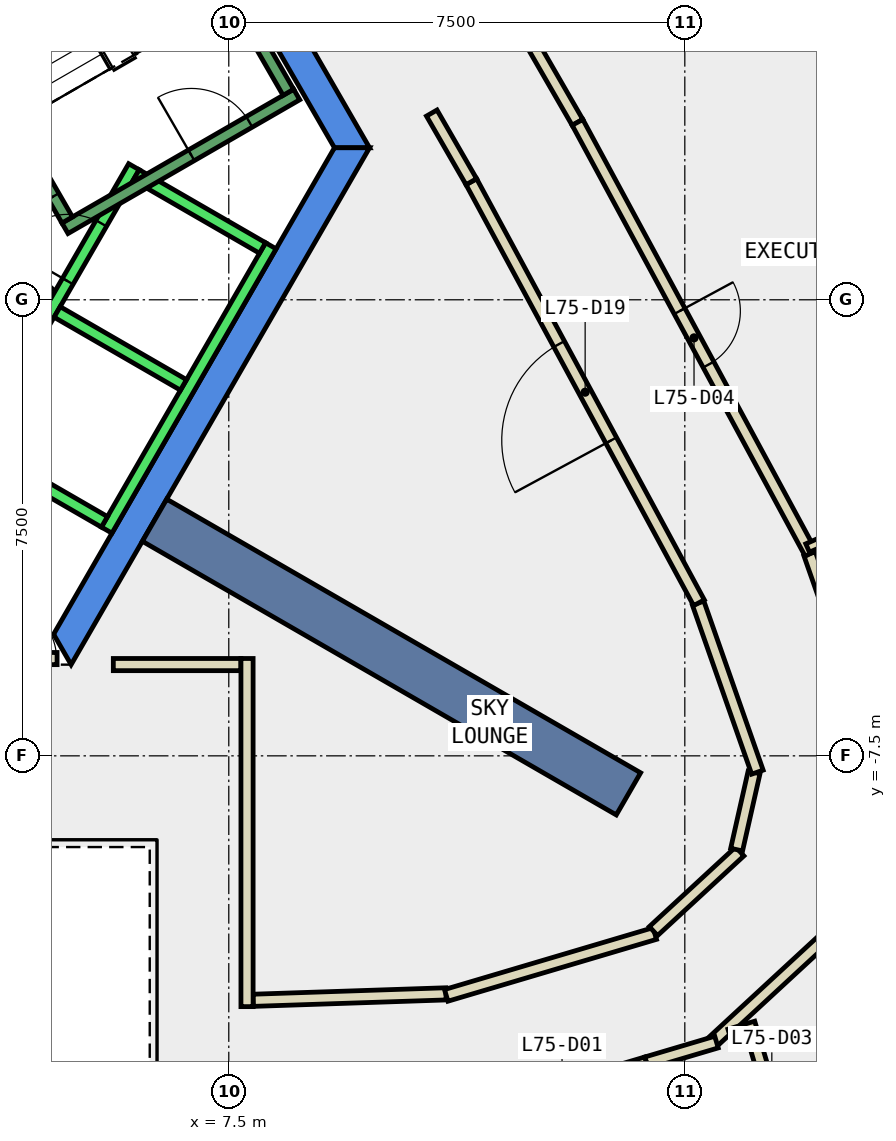
"""IFC4 building model, lengths in metres.
Left out: names, types, materials, properties, quantities, classifications, styles, units other than length and angle.
Written with IfcOpenShell. Run it as: python <this file> out.ifc"""

import sys

from ifc_helpers import new_model, si_unit, direction, frame, frame_2d, origin, place, context, subcontext, project, spatial, polyline, rectangle, outline, extrude, element, fill, save


model = new_model("IFC4")
c1 = context("Model", 3, precision=1e-05, world=origin(), true_north=direction((0.0, 1.0)))
c2 = subcontext(c1, "Body", "Model", "MODEL_VIEW")
j1 = project(units=[si_unit("LENGTHUNIT", "METRE"), si_unit("PLANEANGLEUNIT", "RADIAN")], contexts=[c1])
p1 = place(None, origin())
s1 = spatial("IfcSite", under=j1, at=p1, CompositionType="ELEMENT")
p2 = place(p1, origin())
s2 = spatial("IfcBuilding", under=s1, at=p2, CompositionType="ELEMENT")
p3 = place(p2, frame((0.0, 0.0, 318.8)))
s3 = spatial("IfcBuildingStorey", under=s2, at=p3, CompositionType="ELEMENT", Elevation=318.8)
p4 = place(p3, frame((0.0, 0.0, -0.34)))
e1 = element("IfcWall", 1, at=p4, inside=s3, PredefinedType="SHEAR", context=c2, shape_type="SweptSolid", body=[
    extrude(outline(polyline([(5.486, 9.998), (5.053, 9.748), (9.238, 2.5), (9.815, 2.5), (5.486, 9.998)])), origin(), (0.0, 0.0, 1.0), 3.6),
])
p5 = place(p3, frame((0.0, 0.0, -0.34)))
e2 = element("IfcWall", 2, at=p5, inside=s3, PredefinedType="SHEAR", context=c2, shape_type="SweptSolid", body=[
    extrude(outline(polyline([(4.907, -6.0), (9.815, 2.5), (9.238, 2.5), (4.619, -5.5), (4.907, -6.0)])), origin(), (0.0, 0.0, 1.0), 3.6),
])
p6 = place(p3, frame((6.279, -3.625, -0.34), z_axis=(0.0, 0.0, 1.0), x_axis=(0.866017533419, -0.500013631625, 0.0)))
e3 = element("IfcWall", 3, at=p6, inside=s3, PredefinedType="SHEAR", context=c2, shape_type="SweptSolid", body=[
    extrude(rectangle(XDim=9.0, YDim=0.8, at=frame_2d((4.5, 0.0))), origin(), (0.0, 0.0, 1.0), 3.6),
])
p7 = place(p3, frame((7.9, -11.52, 0.0), z_axis=(0.0, 0.0, 1.0), x_axis=(0.999442599499, 0.033383982774, 0.0)))
e4 = element("IfcWall", 4, at=p7, inside=s3, PredefinedType="PARTITIONING", context=c2, shape_type="SweptSolid", body=[
    extrude(rectangle(XDim=3.174, YDim=0.2, at=frame_2d((1.587, 0.0))), origin(), (0.0, 0.0, 1.0), 3.26),
])
p8 = place(p3, frame((11.076, -11.439, 0.0), z_axis=(0.0, 0.0, 1.0), x_axis=(0.958760241353, 0.284216114252, 0.0)))
e5 = element("IfcWall", 5, at=p8, inside=s3, PredefinedType="PARTITIONING", context=c2, shape_type="SweptSolid", body=[
    extrude(rectangle(XDim=3.578, YDim=0.2, at=frame_2d((1.789, 0.0))), origin(), (0.0, 0.0, 1.0), 3.26),
])
p9 = place(p3, frame((14.484, -10.382, 0.0), z_axis=(0.0, 0.0, 1.0), x_axis=(0.735026247728, 0.678038653139, 0.0)))
e6 = element("IfcWall", 6, at=p9, inside=s3, PredefinedType="PARTITIONING", context=c2, shape_type="SweptSolid", body=[
    extrude(rectangle(XDim=1.932, YDim=0.2, at=frame_2d((0.966, 0.0))), origin(), (0.0, 0.0, 1.0), 3.26),
])
p10 = place(p3, frame((15.852, -9.042, 0.0), z_axis=(0.0, 0.0, 1.0), x_axis=(0.220324178782, 0.975426704701, 0.0)))
e7 = element("IfcWall", 7, at=p10, inside=s3, PredefinedType="PARTITIONING", context=c2, shape_type="SweptSolid", body=[
    extrude(rectangle(XDim=1.302, YDim=0.2, at=frame_2d((0.651, 0.0))), origin(), (0.0, 0.0, 1.0), 3.26),
])
p11 = place(p3, frame((16.194, -7.768, 0.0), z_axis=(0.0, 0.0, 1.0), x_axis=(-0.330981563235, 0.943637220969, 0.0)))
e8 = element("IfcWall", 8, at=p11, inside=s3, PredefinedType="PARTITIONING", context=c2, shape_type="SweptSolid", body=[
    extrude(rectangle(XDim=2.946, YDim=0.2, at=frame_2d((1.473, 0.0))), origin(), (0.0, 0.0, 1.0), 3.26),
])
p12 = place(p3, frame((15.233, -4.982, 0.0), z_axis=(0.0, 0.0, 1.0), x_axis=(-0.475643534049, 0.879638123615, 0.0)))
e9 = element("IfcWall", 9, at=p12, inside=s3, PredefinedType="PARTITIONING", context=c2, shape_type="SweptSolid", body=[
    extrude(rectangle(XDim=7.871, YDim=0.2, at=frame_2d((3.936, 0.0))), origin(), (0.0, 0.0, 1.0), 3.26),
])
p13 = place(p12, frame((3.036, 0.0, 0.0)))
e10 = element("IfcOpeningElement", 10, at=p13, cuts=e9, PredefinedType="OPENING", context=c2, shape_type="SweptSolid", body=[
    extrude(rectangle(XDim=1.8, YDim=2.1, at=frame_2d((0.9, 1.05))), frame((0.0, 0.11, 0.0), z_axis=(0.0, -1.0, 0.0), x_axis=(1.0, 0.0, 0.0)), (0.0, 0.0, 1.0), 0.22),
])
p14 = place(p3, frame((11.489, 1.942, 0.0), z_axis=(0.0, 0.0, 1.0), x_axis=(-0.499544076393, 0.866288471435, 0.0)))
e11 = element("IfcWall", 11, at=p14, inside=s3, PredefinedType="PARTITIONING", context=c2, shape_type="SweptSolid", body=[
    extrude(rectangle(XDim=1.303, YDim=0.2, at=frame_2d((0.652, 0.0))), origin(), (0.0, 0.0, 1.0), 3.26),
])
p15 = place(p3, frame((14.371, -12.548, 0.0), z_axis=(0.0, 0.0, 1.0), x_axis=(-0.958773475867, -0.284171465799, 0.0)))
e12 = element("IfcWall", 12, at=p15, inside=s3, PredefinedType="PARTITIONING", context=c2, shape_type="SweptSolid", body=[
    extrude(rectangle(XDim=2.9, YDim=0.2, at=frame_2d((1.45, 0.0))), origin(), (0.0, 0.0, 1.0), 3.26),
])
p16 = place(p15, frame((0.95, 0.0, 0.0)))
e13 = element("IfcOpeningElement", 13, at=p16, cuts=e12, PredefinedType="OPENING", context=c2, shape_type="SweptSolid", body=[
    extrude(rectangle(XDim=1.0, YDim=2.1, at=frame_2d((0.5, 1.05))), frame((0.0, 0.11, 0.0), z_axis=(0.0, -1.0, 0.0), x_axis=(1.0, 0.0, 0.0)), (0.0, 0.0, 1.0), 0.22),
])
p17 = place(p3, frame((17.053, -4.177, 0.0), z_axis=(0.0, 0.0, 1.0), x_axis=(0.33112192567, -0.943587977001, 0.0)))
e14 = element("IfcWall", 14, at=p17, inside=s3, PredefinedType="PARTITIONING", context=c2, shape_type="SweptSolid", body=[
    extrude(rectangle(XDim=3.678, YDim=0.2, at=frame_2d((1.839, 0.0))), origin(), (0.0, 0.0, 1.0), 3.26),
])
p18 = place(p3, frame((17.718, -10.119, 0.0), z_axis=(0.0, 0.0, 1.0), x_axis=(-0.734673909713, -0.678420405344, 0.0)))
e15 = element("IfcWall", 15, at=p18, inside=s3, PredefinedType="PARTITIONING", context=c2, shape_type="SweptSolid", body=[
    extrude(rectangle(XDim=3.107, YDim=0.2, at=frame_2d((1.554, 0.0))), origin(), (0.0, 0.0, 1.0), 3.26),
])
p19 = place(p3, frame((15.521, -12.207, 0.0), z_axis=(0.0, 0.0, 1.0), x_axis=(-0.958717989575, -0.2843586054, 0.0)))
e16 = element("IfcWall", 16, at=p19, inside=s3, PredefinedType="PARTITIONING", context=c2, shape_type="SweptSolid", body=[
    extrude(rectangle(XDim=1.199, YDim=0.2, at=frame_2d((0.6, 0.0))), origin(), (0.0, 0.0, 1.0), 3.26),
])
p20 = place(p3, frame((11.344, 6.193, 0.0), z_axis=(0.0, 0.0, 1.0), x_axis=(0.50004096614, -0.86600175068, 0.0)))
e17 = element("IfcWall", 17, at=p20, inside=s3, PredefinedType="PARTITIONING", context=c2, shape_type="SweptSolid", body=[
    extrude(rectangle(XDim=3.782, YDim=0.2, at=frame_2d((1.891, 0.0))), origin(), (0.0, 0.0, 1.0), 3.26),
])
p21 = place(p3, frame((13.235, 2.918, 0.0), z_axis=(0.0, 0.0, 1.0), x_axis=(0.475681790703, -0.879617436158, 0.0)))
e18 = element("IfcWall", 18, at=p21, inside=s3, PredefinedType="PARTITIONING", context=c2, shape_type="SweptSolid", body=[
    extrude(rectangle(XDim=8.058, YDim=0.2, at=frame_2d((4.029, 0.0))), origin(), (0.0, 0.0, 1.0), 3.26),
])
p22 = place(p21, frame((3.529, 0.0, 0.0)))
e19 = element("IfcOpeningElement", 19, at=p22, cuts=e18, PredefinedType="OPENING", context=c2, shape_type="SweptSolid", body=[
    extrude(rectangle(XDim=1.0, YDim=2.1, at=frame_2d((0.5, 1.05))), frame((0.0, 0.11, 0.0), z_axis=(0.0, -1.0, 0.0), x_axis=(1.0, 0.0, 0.0)), (0.0, 0.0, 1.0), 0.22),
])
p23 = place(p3, frame((5.601, -5.999, 0.0), z_axis=(0.0, 0.0, 1.0), x_axis=(1.0, 0.0, 0.0)))
e20 = element("IfcWall", 20, at=p23, inside=s3, PredefinedType="PARTITIONING", context=c2, shape_type="SweptSolid", body=[
    extrude(rectangle(XDim=2.099, YDim=0.2, at=frame_2d((1.049, 0.0))), origin(), (0.0, 0.0, 1.0), 3.26),
])
p24 = place(p3, frame((7.8, -5.899, 0.0), z_axis=(0.0, 0.0, 1.0), x_axis=(0.0, -1.0, 0.0)))
e21 = element("IfcWall", 21, at=p24, inside=s3, PredefinedType="PARTITIONING", context=c2, shape_type="SweptSolid", body=[
    extrude(rectangle(XDim=5.725, YDim=0.2, at=frame_2d((2.863, 0.0))), origin(), (0.0, 0.0, 1.0), 3.26),
])
p25 = place(p3, frame((16.808, -14.433, 0.0), z_axis=(0.0, 0.0, 1.0), x_axis=(-0.284524220245, 0.958668852156, 0.0)))
e22 = element("IfcWall", 22, at=p25, inside=s3, PredefinedType="PARTITIONING", context=c2, shape_type="SweptSolid", body=[
    extrude(rectangle(XDim=2.651, YDim=0.2, at=frame_2d((1.325, 0.0))), origin(), (0.0, 0.0, 1.0), 3.26),
])
p26 = place(p25, frame((0.875, 0.0, 0.0)))
e23 = element("IfcOpeningElement", 23, at=p26, cuts=e22, PredefinedType="OPENING", context=c2, shape_type="SweptSolid", body=[
    extrude(rectangle(XDim=0.9, YDim=2.1, at=frame_2d((0.45, 1.05))), frame((0.0, 0.11, 0.0), z_axis=(0.0, -1.0, 0.0), x_axis=(1.0, 0.0, 0.0)), (0.0, 0.0, 1.0), 0.22),
])
p27 = place(p3, frame((15.987, -12.017, 0.0), z_axis=(0.0, 0.0, 1.0), x_axis=(-0.958598776535, -0.284760224794, 0.0)))
e24 = element("IfcWall", 24, at=p27, inside=s3, PredefinedType="PARTITIONING", context=c2, shape_type="SweptSolid", body=[
    extrude(rectangle(XDim=0.26, YDim=0.2, at=frame_2d((0.13, 0.0))), origin(), (0.0, 0.0, 1.0), 3.26),
])
p28 = place(p3, frame((17.02, -4.082, 0.0), z_axis=(0.0, 0.0, 1.0), x_axis=(0.914599611743, 0.404360668462, 0.0)))
e25 = element("IfcWall", 25, at=p28, inside=s3, PredefinedType="PARTITIONING", context=c2, shape_type="SweptSolid", body=[
    extrude(rectangle(XDim=4.296, YDim=0.15, at=frame_2d((2.148, 0.0))), origin(), (0.0, 0.0, 1.0), 3.26),
])
p29 = place(p3, frame((3.75, -5.9, 0.0), z_axis=(0.0, 0.0, 1.0), x_axis=(1.0, 0.0, 0.0)))
e26 = element("IfcWall", 26, at=p29, inside=s3, PredefinedType="PARTITIONING", context=c2, shape_type="SweptSolid", body=[
    extrude(rectangle(XDim=0.926, YDim=0.2, at=frame_2d((0.463, 0.0))), origin(), (0.0, 0.0, 1.0), 2.4),
])
p30 = place(p29, frame((0.017, 0.0, 0.0)))
e27 = element("IfcOpeningElement", 27, at=p30, cuts=e26, PredefinedType="OPENING", context=c2, shape_type="SweptSolid", body=[
    extrude(rectangle(XDim=0.9, YDim=2.1, at=frame_2d((0.45, 1.05))), frame((0.0, 0.11, 0.0), z_axis=(0.0, -1.0, 0.0), x_axis=(1.0, 0.0, 0.0)), (0.0, 0.0, 1.0), 0.22),
])
p31 = place(p3, frame((3.24, -2.488, 0.0), z_axis=(0.0, 0.0, 1.0), x_axis=(0.500034260056, 0.866005622828, 0.0)))
e28 = element("IfcWall", 28, at=p31, inside=s3, PredefinedType="STANDARD", context=c2, shape_type="SweptSolid", body=[
    extrude(rectangle(XDim=5.399, YDim=0.2, at=frame_2d((2.7, 0.0))), origin(), (0.0, 0.0, 1.0), 3.26),
])
p32 = place(p31, frame((3.225, 0.0, 0.0)))
e29 = element("IfcOpeningElement", 29, at=p32, cuts=e28, PredefinedType="OPENING", context=c2, shape_type="SweptSolid", body=[
    extrude(rectangle(XDim=1.1, YDim=2.1, at=frame_2d((0.55, 1.05))), frame((0.0, 0.11, 0.0), z_axis=(0.0, -1.0, 0.0), x_axis=(1.0, 0.0, 0.0)), (0.0, 0.0, 1.0), 0.22),
])
p33 = place(p31, frame((1.225, 0.0, 0.0)))
e30 = element("IfcOpeningElement", 30, at=p33, cuts=e28, PredefinedType="OPENING", context=c2, shape_type="SweptSolid", body=[
    extrude(rectangle(XDim=1.1, YDim=2.1, at=frame_2d((0.55, 1.05))), frame((0.0, 0.11, 0.0), z_axis=(0.0, -1.0, 0.0), x_axis=(1.0, 0.0, 0.0)), (0.0, 0.0, 1.0), 0.22),
])
p34 = place(p3, frame((5.492, -3.788, 0.0), z_axis=(0.0, 0.0, 1.0), x_axis=(0.500034260056, 0.866005622828, 0.0)))
e31 = element("IfcWall", 31, at=p34, inside=s3, PredefinedType="STANDARD", context=c2, shape_type="SweptSolid", body=[
    extrude(rectangle(XDim=5.399, YDim=0.2, at=frame_2d((2.7, 0.0))), origin(), (0.0, 0.0, 1.0), 3.26),
])
p35 = place(p3, frame((3.377, -2.452, 0.0), z_axis=(0.0, 0.0, 1.0), x_axis=(0.865955154139, -0.50012165622, 0.0)))
e32 = element("IfcWall", 32, at=p35, inside=s3, PredefinedType="STANDARD", context=c2, shape_type="SweptSolid", body=[
    extrude(rectangle(XDim=2.4, YDim=0.2, at=frame_2d((1.2, 0.0))), origin(), (0.0, 0.0, 1.0), 3.26),
])
for number, where, z_axis, x_axis in (
    (33, (4.677, -0.2, 0.0), (0.0, 0.0, 1.0), (0.866, -0.5, 0.0)),
    (34, (5.977, 2.052, 0.0), (0.0, 0.0, 1.0), (0.866, -0.5, 0.0)),
):
    element("IfcWall", number, at=place(p3, frame(where, z_axis=z_axis, x_axis=x_axis)), inside=s3, PredefinedType="STANDARD", context=c2, shape_type="SweptSolid", body=[
        extrude(rectangle(XDim=2.399, YDim=0.2, at=frame_2d((1.2, 0.0))), origin(), (0.0, 0.0, 1.0), 3.26),
    ])
p36 = place(p3, frame((4.806, 1.176, 0.0), z_axis=(0.0, 0.0, 1.0), x_axis=(0.866059941101, 0.499940174841, 0.0)))
e35 = element("IfcWall", 35, at=p36, inside=s3, PredefinedType="STANDARD", context=c2, shape_type="SweptSolid", body=[
    extrude(rectangle(XDim=4.4, YDim=0.2, at=frame_2d((2.2, 0.0))), origin(), (0.0, 0.0, 1.0), 3.26),
])
p37 = place(p36, frame((2.4, 0.0, 0.0)))
e36 = element("IfcOpeningElement", 36, at=p37, cuts=e35, PredefinedType="OPENING", context=c2, shape_type="SweptSolid", body=[
    extrude(rectangle(XDim=1.1, YDim=2.2, at=frame_2d((0.55, 1.1))), frame((0.0, 0.11, 0.0), z_axis=(0.0, -1.0, 0.0), x_axis=(1.0, 0.0, 0.0)), (0.0, 0.0, 1.0), 0.22),
])
p38 = place(p3, frame((4.843, 1.312, 0.0), z_axis=(0.0, 0.0, 1.0), x_axis=(-0.499963383562, 0.866046543262, 0.0)))
e37 = element("IfcWall", 37, at=p38, inside=s3, PredefinedType="STANDARD", context=c2, shape_type="SweptSolid", body=[
    extrude(rectangle(XDim=6.9, YDim=0.2, at=frame_2d((3.45, 0.0))), origin(), (0.0, 0.0, 1.0), 3.26),
])
p39 = place(p38, frame((0.45, 0.0, 0.0)))
e38 = element("IfcOpeningElement", 38, at=p39, cuts=e37, PredefinedType="OPENING", context=c2, shape_type="SweptSolid", body=[
    extrude(rectangle(XDim=1.1, YDim=2.2, at=frame_2d((0.55, 1.1))), frame((0.0, 0.11, 0.0), z_axis=(0.0, -1.0, 0.0), x_axis=(1.0, 0.0, 0.0)), (0.0, 0.0, 1.0), 0.22),
])
p40 = place(p3, frame((8.48, 3.412, 0.0), z_axis=(0.0, 0.0, 1.0), x_axis=(-0.499978703459, 0.866037698999, 0.0)))
e39 = element("IfcWall", 39, at=p40, inside=s3, PredefinedType="STANDARD", context=c2, shape_type="SweptSolid", body=[
    extrude(rectangle(XDim=6.9, YDim=0.2, at=frame_2d((3.45, 0.0))), origin(), (0.0, 0.0, 1.0), 3.26),
])
p41 = place(p22, origin())
e40 = element("IfcDoor", 40, at=p41, inside=s3, OperationType="SINGLE_SWING_LEFT", PredefinedType="DOOR", context=c2, shape_type="SweptSolid", body=[
    extrude(rectangle(XDim=1.0, YDim=2.1, at=frame_2d((0.5, 1.05))), frame((0.0, 0.025, 0.0), z_axis=(0.0, -1.0, 0.0), x_axis=(1.0, 0.0, 0.0)), (0.0, 0.0, 1.0), 0.05),
])
fill(e19, e40)
p42 = place(p13, origin())
e41 = element("IfcDoor", 41, at=p42, inside=s3, OperationType="DOUBLE_DOOR_SINGLE_SWING", PredefinedType="DOOR", context=c2, shape_type="SweptSolid", body=[
    extrude(rectangle(XDim=1.8, YDim=2.1, at=frame_2d((0.9, 1.05))), frame((0.0, 0.025, 0.0), z_axis=(0.0, -1.0, 0.0), x_axis=(1.0, 0.0, 0.0)), (0.0, 0.0, 1.0), 0.05),
])
fill(e10, e41)
p43 = place(p30, origin())
e42 = element("IfcDoor", 42, at=p43, inside=s3, OperationType="SINGLE_SWING_LEFT", PredefinedType="DOOR", context=c2, shape_type="SweptSolid", body=[
    extrude(rectangle(XDim=0.9, YDim=2.1, at=frame_2d((0.45, 1.05))), frame((0.0, 0.025, 0.0), z_axis=(0.0, -1.0, 0.0), x_axis=(1.0, 0.0, 0.0)), (0.0, 0.0, 1.0), 0.05),
])
fill(e27, e42)
p44 = place(p32, origin())
e43 = element("IfcDoor", 43, at=p44, inside=s3, OperationType="SLIDING_TO_LEFT", PredefinedType="DOOR", context=c2, shape_type="SweptSolid", body=[
    extrude(rectangle(XDim=1.1, YDim=2.1, at=frame_2d((0.55, 1.05))), frame((0.0, 0.025, 0.0), z_axis=(0.0, -1.0, 0.0), x_axis=(1.0, 0.0, 0.0)), (0.0, 0.0, 1.0), 0.05),
])
fill(e29, e43)
p45 = place(p39, origin())
e44 = element("IfcDoor", 44, at=p45, inside=s3, OperationType="SINGLE_SWING_LEFT", PredefinedType="DOOR", context=c2, shape_type="SweptSolid", body=[
    extrude(rectangle(XDim=1.1, YDim=2.2, at=frame_2d((0.55, 1.1))), frame((0.0, 0.025, 0.0), z_axis=(0.0, -1.0, 0.0), x_axis=(1.0, 0.0, 0.0)), (0.0, 0.0, 1.0), 0.05),
])
fill(e38, e44)
p46 = place(p37, origin())
e45 = element("IfcDoor", 45, at=p46, inside=s3, OperationType="SINGLE_SWING_LEFT", PredefinedType="DOOR", context=c2, shape_type="SweptSolid", body=[
    extrude(rectangle(XDim=1.1, YDim=2.2, at=frame_2d((0.55, 1.1))), frame((0.0, 0.025, 0.0), z_axis=(0.0, -1.0, 0.0), x_axis=(1.0, 0.0, 0.0)), (0.0, 0.0, 1.0), 0.05),
])
fill(e36, e45)
save(model, sys.argv[1])
